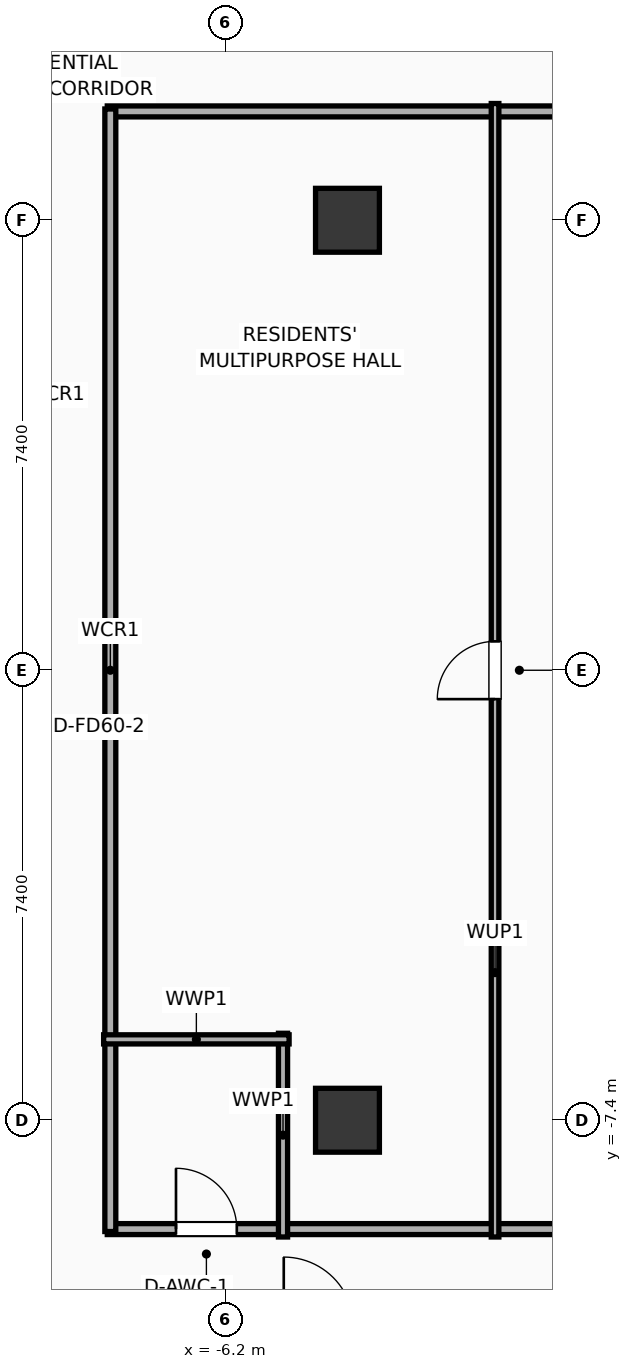
"""IFC4 building model, lengths in metres.
Left out: names, types, materials, properties, quantities, classifications, styles, units other than length and angle.
Written with IfcOpenShell. Run it as: python <this file> out.ifc"""

import sys

from ifc_helpers import new_model, si_unit, direction, frame, frame_2d, origin, origin_2d, place, context, subcontext, project, spatial, rectangle, extrude, element, fill, save


model = new_model("IFC4")
c1 = context("Model", 3, precision=1e-05, world=origin(), true_north=direction((0.0, 1.0)))
c2 = subcontext(c1, "Body", "Model", "MODEL_VIEW")
j1 = project(units=[si_unit("LENGTHUNIT", "METRE"), si_unit("PLANEANGLEUNIT", "RADIAN")], contexts=[c1])
p1 = place(None, origin())
s1 = spatial("IfcSite", under=j1, at=p1, CompositionType="ELEMENT")
p2 = place(p1, origin())
s2 = spatial("IfcBuilding", under=s1, at=p2, CompositionType="ELEMENT")
p3 = place(p2, frame((0.0, 0.0, 85.8)))
s3 = spatial("IfcBuildingStorey", under=s2, at=p3, CompositionType="ELEMENT", Elevation=85.8)
for number, where, z_axis, x_axis in (
    (1, (-4.2, -7.4, 0.0), (0.0, 0.0, 1.0), (1.0, 0.0, 0.0)),
    (2, (-4.2, 7.4, 0.0), (0.0, 0.0, 1.0), (1.0, 0.0, 0.0)),
):
    element("IfcColumn", number, at=place(p3, frame(where, z_axis=z_axis, x_axis=x_axis)), inside=s3, PredefinedType="COLUMN", context=c2, shape_type="SweptSolid", body=[
        extrude(rectangle(XDim=1.05, YDim=1.05, at=origin_2d()), origin(), (0.0, 0.0, 1.0), 3.9),
    ])
p4 = place(p3, frame((-8.15, 9.19, 0.0), z_axis=(0.0, 0.0, 1.0), x_axis=(1.0, 0.0, 0.0)))
e3 = element("IfcWall", 3, at=p4, inside=s3, PredefinedType="PARTITIONING", context=c2, shape_type="SweptSolid", body=[
    extrude(rectangle(XDim=16.3, YDim=0.18, at=frame_2d((8.15, 0.0))), origin(), (0.0, 0.0, 1.0), 3.65),
])
p5 = place(p4, frame((8.49, 0.0, 0.0)))
e4 = element("IfcOpeningElement", 4, at=p5, cuts=e3, PredefinedType="OPENING", context=c2, shape_type="SweptSolid", body=[
    extrude(rectangle(XDim=0.95, YDim=2.05, at=frame_2d((0.475, 1.025))), frame((0.0, 0.1, 0.0), z_axis=(0.0, -1.0, 0.0), x_axis=(1.0, 0.0, 0.0)), (0.0, 0.0, 1.0), 0.2),
])
p6 = place(p3, frame((-8.15, -9.19, 0.0), z_axis=(0.0, 0.0, 1.0), x_axis=(1.0, 0.0, 0.0)))
e5 = element("IfcWall", 5, at=p6, inside=s3, PredefinedType="PARTITIONING", context=c2, shape_type="SweptSolid", body=[
    extrude(rectangle(XDim=16.3, YDim=0.18, at=frame_2d((8.15, 0.0))), origin(), (0.0, 0.0, 1.0), 3.65),
])
p7 = place(p6, frame((1.13, 0.0, 0.0)))
e6 = element("IfcOpeningElement", 6, at=p7, cuts=e5, PredefinedType="OPENING", context=c2, shape_type="SweptSolid", body=[
    extrude(rectangle(XDim=1.0, YDim=2.05, at=frame_2d((0.5, 1.025))), frame((0.0, 0.1, 0.0), z_axis=(0.0, -1.0, 0.0), x_axis=(1.0, 0.0, 0.0)), (0.0, 0.0, 1.0), 0.2),
])
p8 = place(p6, frame((10.12, 0.0, 0.0)))
e7 = element("IfcOpeningElement", 7, at=p8, cuts=e5, PredefinedType="OPENING", context=c2, shape_type="SweptSolid", body=[
    extrude(rectangle(XDim=0.95, YDim=2.05, at=frame_2d((0.475, 1.025))), frame((0.0, 0.1, 0.0), z_axis=(0.0, -1.0, 0.0), x_axis=(1.0, 0.0, 0.0)), (0.0, 0.0, 1.0), 0.2),
])
p9 = place(p3, frame((-8.1, -9.23, 0.0), z_axis=(0.0, 0.0, 1.0), x_axis=(0.0, 1.0, 0.0)))
e8 = element("IfcWall", 8, at=p9, inside=s3, PredefinedType="PARTITIONING", context=c2, shape_type="SweptSolid", body=[
    extrude(rectangle(XDim=18.46, YDim=0.18, at=frame_2d((9.23, 0.0))), origin(), (0.0, 0.0, 1.0), 3.65),
])
p10 = place(p3, frame((-5.26, -9.32, 0.0), z_axis=(0.0, 0.0, 1.0), x_axis=(0.0, 1.0, 0.0)))
e9 = element("IfcWall", 9, at=p10, inside=s3, PredefinedType="PLUMBINGWALL", context=c2, shape_type="SweptSolid", body=[
    extrude(rectangle(XDim=3.35, YDim=0.15, at=frame_2d((1.675, 0.0))), origin(), (0.0, 0.0, 1.0), 3.65),
])
p11 = place(p3, frame((-8.21, -6.07, 0.0), z_axis=(0.0, 0.0, 1.0), x_axis=(1.0, 0.0, 0.0)))
e10 = element("IfcWall", 10, at=p11, inside=s3, PredefinedType="PLUMBINGWALL", context=c2, shape_type="SweptSolid", body=[
    extrude(rectangle(XDim=3.05, YDim=0.15, at=frame_2d((1.525, 0.0))), origin(), (0.0, 0.0, 1.0), 3.65),
])
p12 = place(p3, frame((-1.773, -9.32, 0.0), z_axis=(0.0, 0.0, 1.0), x_axis=(0.0, 1.0, 0.0)))
e11 = element("IfcWall", 11, at=p12, inside=s3, PredefinedType="PARTITIONING", context=c2, shape_type="SweptSolid", body=[
    extrude(rectangle(XDim=18.64, YDim=0.125, at=frame_2d((9.32, 0.0))), origin(), (0.0, 0.0, 1.0), 3.65),
])
p13 = place(p12, frame((8.845, 0.0, 0.0)))
e12 = element("IfcOpeningElement", 12, at=p13, cuts=e11, PredefinedType="OPENING", context=c2, shape_type="SweptSolid", body=[
    extrude(rectangle(XDim=0.95, YDim=2.05, at=frame_2d((0.475, 1.025))), frame((0.0, 0.073, 0.0), z_axis=(0.0, -1.0, 0.0), x_axis=(1.0, 0.0, 0.0)), (0.0, 0.0, 1.0), 0.145),
])
p14 = place(p7, origin())
e13 = element("IfcDoor", 13, at=p14, inside=s3, OperationType="SINGLE_SWING_LEFT", PredefinedType="DOOR", context=c2, shape_type="SweptSolid", body=[
    extrude(rectangle(XDim=1.0, YDim=2.05, at=frame_2d((0.5, 1.025))), frame((0.0, 0.025, 0.0), z_axis=(0.0, -1.0, 0.0), x_axis=(1.0, 0.0, 0.0)), (0.0, 0.0, 1.0), 0.05),
])
fill(e6, e13)
p15 = place(p13, origin())
e14 = element("IfcDoor", 14, at=p15, inside=s3, OperationType="SINGLE_SWING_LEFT", PredefinedType="DOOR", context=c2, shape_type="SweptSolid", body=[
    extrude(rectangle(XDim=0.95, YDim=2.05, at=frame_2d((0.475, 1.025))), frame((0.0, 0.025, 0.0), z_axis=(0.0, -1.0, 0.0), x_axis=(1.0, 0.0, 0.0)), (0.0, 0.0, 1.0), 0.05),
])
fill(e12, e14)
save(model, sys.argv[1])
